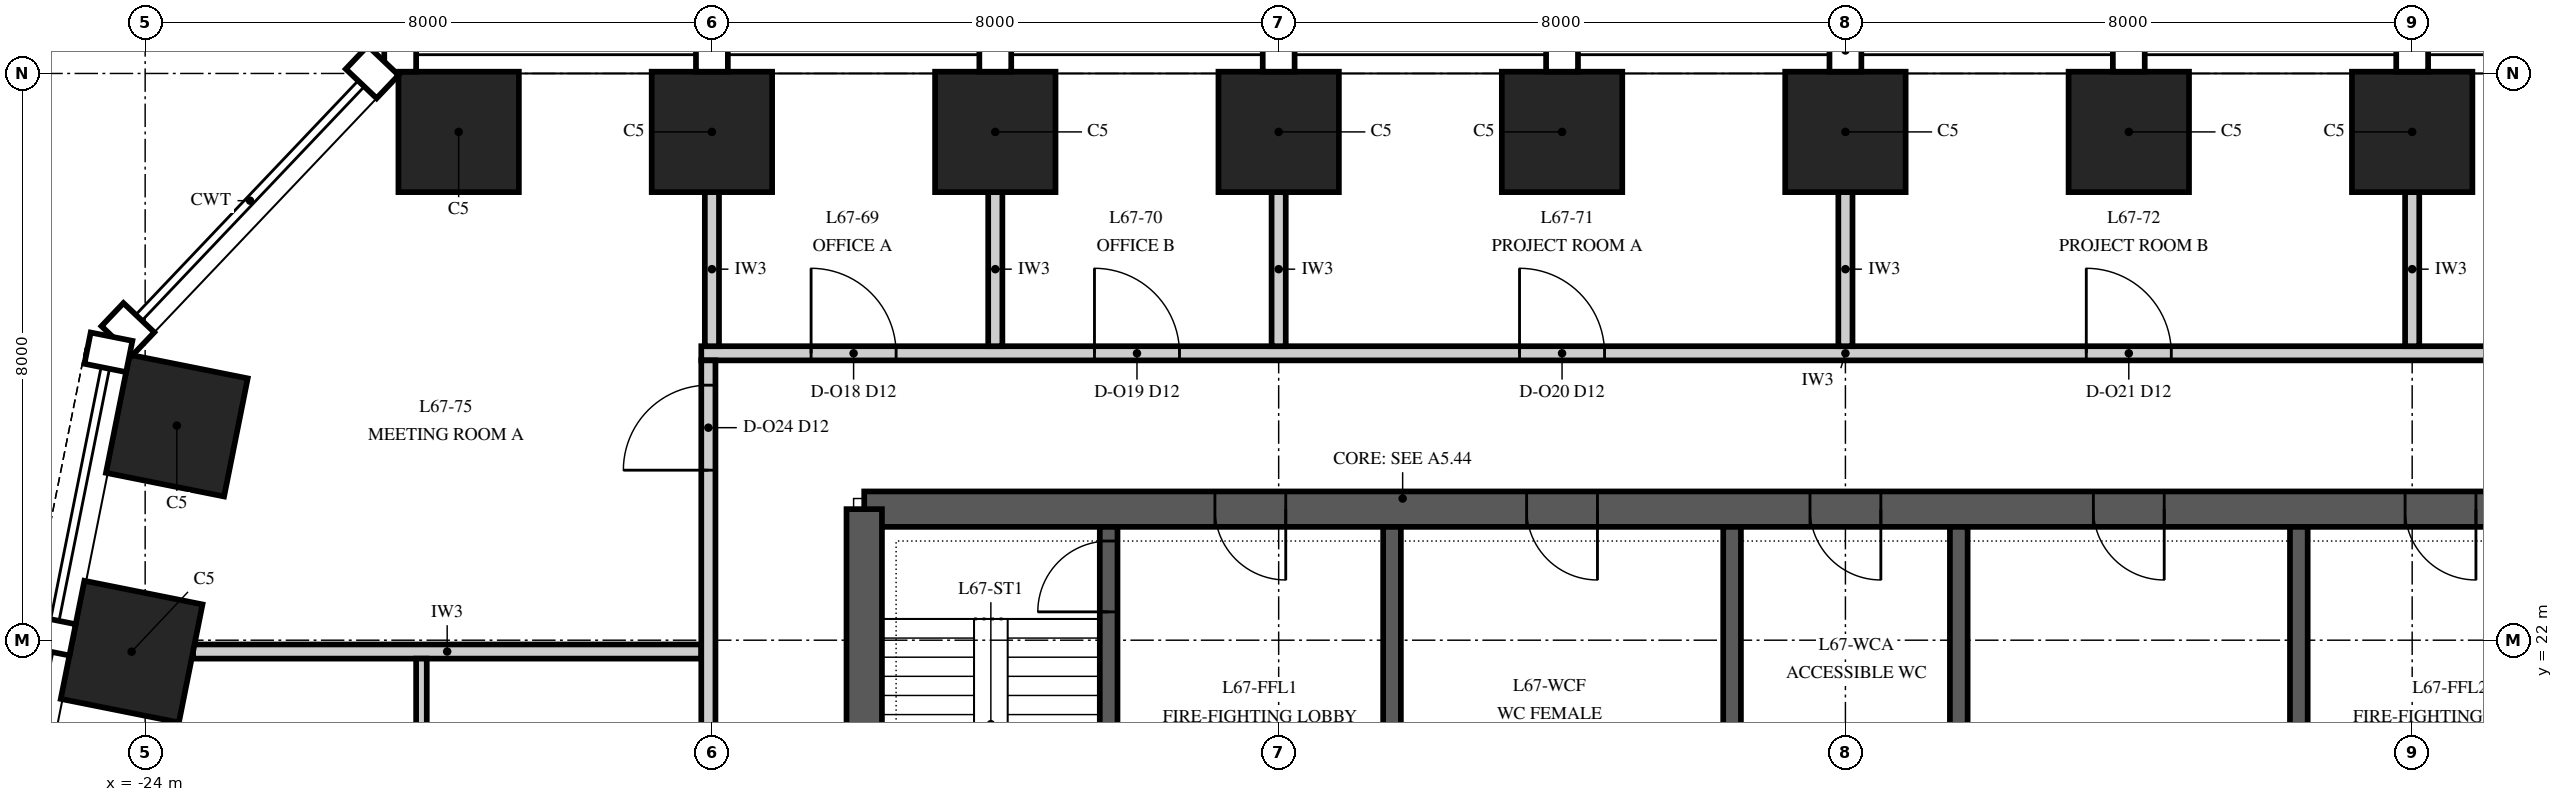
"""IFC4 building model, lengths in metres.
Left out: names, types, materials, properties, quantities, classifications, styles, units other than length and angle.
Written with IfcOpenShell. Run it as: python <this file> out.ifc"""

import sys

from ifc_helpers import new_model, si_unit, direction, frame, frame_2d, origin, origin_2d, place, context, subcontext, project, spatial, polyline, rectangle, outline, extrude, element, fill, save


model = new_model("IFC4")
c1 = context("Model", 3, precision=1e-05, world=origin(), true_north=direction((0.0, 1.0)))
c2 = subcontext(c1, "Body", "Model", "MODEL_VIEW")
j1 = project(units=[si_unit("LENGTHUNIT", "METRE"), si_unit("PLANEANGLEUNIT", "RADIAN")], contexts=[c1])
p1 = place(None, origin())
s1 = spatial("IfcSite", under=j1, at=p1, CompositionType="ELEMENT")
p2 = place(p1, origin())
s2 = spatial("IfcBuilding", under=s1, at=p2, CompositionType="ELEMENT")
p3 = place(p2, frame((0.0, 0.0, 288.0)))
s3 = spatial("IfcBuildingStorey", under=s2, at=p3, CompositionType="ELEMENT", Elevation=288.0)
for number, where, z_axis, x_axis in (
    (1, (8.0, 29.175, 0.0), (0.0, 0.0, 1.0), (-1.0, 0.0, 0.0)),
    (2, (4.0, 29.175, 0.0), (0.0, 0.0, 1.0), (-1.0, 0.0, 0.0)),
    (3, (0.0, 29.175, 0.0), (0.0, 0.0, 1.0), (-1.0, 0.0, 0.0)),
    (4, (-4.0, 29.175, 0.0), (0.0, 0.0, 1.0), (-1.0, 0.0, 0.0)),
    (5, (-8.0, 29.175, 0.0), (0.0, 0.0, 1.0), (-1.0, 0.0, 0.0)),
    (6, (-12.0, 29.175, 0.0), (0.0, 0.0, 1.0), (-1.0, 0.0, 0.0)),
    (7, (-16.0, 29.175, 0.0), (0.0, 0.0, 1.0), (-1.0, 0.0, 0.0)),
    (8, (-19.575, 29.175, 0.0), (0.0, 0.0, 1.0), (-1.0, 0.0, 0.0)),
    (9, (-23.553, 25.029, 0.0), (0.0, 0.0, 1.0), (-0.196, -0.981, 0.0)),
    (10, (-24.191, 21.838, 0.0), (0.0, 0.0, 1.0), (-0.196, -0.981, 0.0)),
):
    element("IfcColumn", number, at=place(p3, frame(where, z_axis=z_axis, x_axis=x_axis)), inside=s3, PredefinedType="COLUMN", context=c2, shape_type="SweptSolid", body=[
        extrude(rectangle(XDim=1.7, YDim=1.7, at=origin_2d()), origin(), (0.0, 0.0, 1.0), 4.0),
    ])
p4 = place(p3, frame((13.85, 23.85, 0.0), z_axis=(0.0, 0.0, 1.0), x_axis=(-1.0, 0.0, 0.0)))
e11 = element("IfcWall", 11, at=p4, inside=s3, PredefinedType="SHEAR", context=c2, shape_type="SweptSolid", body=[
    extrude(rectangle(XDim=27.7, YDim=0.5, at=frame_2d((13.85, 0.0))), origin(), (0.0, 0.0, 1.0), 4.0),
])
p5 = place(p4, frame((21.75, 0.0, 0.0)))
e12 = element("IfcOpeningElement", 12, at=p5, cuts=e11, PredefinedType="OPENING", context=c2, shape_type="SweptSolid", body=[
    extrude(rectangle(XDim=1.0, YDim=2.1, at=frame_2d((0.5, 1.05))), frame((0.0, 0.265, 0.0), z_axis=(0.0, -1.0, 0.0), x_axis=(1.0, 0.0, 0.0)), (0.0, 0.0, 1.0), 0.53),
])
p6 = place(p4, frame((4.95, 0.0, 0.0)))
e13 = element("IfcOpeningElement", 13, at=p6, cuts=e11, PredefinedType="OPENING", context=c2, shape_type="SweptSolid", body=[
    extrude(rectangle(XDim=1.0, YDim=2.1, at=frame_2d((0.5, 1.05))), frame((0.0, 0.265, 0.0), z_axis=(0.0, -1.0, 0.0), x_axis=(1.0, 0.0, 0.0)), (0.0, 0.0, 1.0), 0.53),
])
p7 = place(p4, frame((17.35, 0.0, 0.0)))
e14 = element("IfcOpeningElement", 14, at=p7, cuts=e11, PredefinedType="OPENING", context=c2, shape_type="SweptSolid", body=[
    extrude(rectangle(XDim=1.0, YDim=2.1, at=frame_2d((0.5, 1.05))), frame((0.0, 0.265, 0.0), z_axis=(0.0, -1.0, 0.0), x_axis=(1.0, 0.0, 0.0)), (0.0, 0.0, 1.0), 0.53),
])
p8 = place(p4, frame((13.35, 0.0, 0.0)))
e15 = element("IfcOpeningElement", 15, at=p8, cuts=e11, PredefinedType="OPENING", context=c2, shape_type="SweptSolid", body=[
    extrude(rectangle(XDim=1.0, YDim=2.1, at=frame_2d((0.5, 1.05))), frame((0.0, 0.265, 0.0), z_axis=(0.0, -1.0, 0.0), x_axis=(1.0, 0.0, 0.0)), (0.0, 0.0, 1.0), 0.53),
])
p9 = place(p4, frame((9.35, 0.0, 0.0)))
e16 = element("IfcOpeningElement", 16, at=p9, cuts=e11, PredefinedType="OPENING", context=c2, shape_type="SweptSolid", body=[
    extrude(rectangle(XDim=1.0, YDim=2.1, at=frame_2d((0.5, 1.05))), frame((0.0, 0.265, 0.0), z_axis=(0.0, -1.0, 0.0), x_axis=(1.0, 0.0, 0.0)), (0.0, 0.0, 1.0), 0.53),
])
p10 = place(p3, frame((-13.85, 23.85, 0.0), z_axis=(0.0, 0.0, 1.0), x_axis=(0.0, -1.0, 0.0)))
e17 = element("IfcWall", 17, at=p10, inside=s3, PredefinedType="SHEAR", context=c2, shape_type="SweptSolid", body=[
    extrude(outline(polyline([(0.0, -0.25), (17.7, -0.25), (17.7, 0.0), (17.45, 0.0), (17.45, 0.25), (0.25, 0.25), (0.25, 0.0), (0.0, 0.0), (0.0, -0.25)])), origin(), (0.0, 0.0, 1.0), 4.0),
])
p11 = place(p10, frame((11.75, 0.0, 0.0)))
e18 = element("IfcOpeningElement", 18, at=p11, cuts=e17, PredefinedType="OPENING", context=c2, shape_type="SweptSolid", body=[
    extrude(rectangle(XDim=1.8, YDim=2.4, at=frame_2d((0.9, 1.2))), frame((0.0, 0.265, 0.0), z_axis=(0.0, -1.0, 0.0), x_axis=(1.0, 0.0, 0.0)), (0.0, 0.0, 1.0), 0.53),
])
p12 = place(p3, frame((-10.4, 16.125, 0.0), z_axis=(0.0, 0.0, 1.0), x_axis=(0.0, 1.0, 0.0)))
e19 = element("IfcWall", 19, at=p12, inside=s3, PredefinedType="SHEAR", context=c2, shape_type="SweptSolid", body=[
    extrude(rectangle(XDim=7.475, YDim=0.25, at=frame_2d((3.738, 0.0))), origin(), (0.0, 0.0, 1.0), 4.0),
])
p13 = place(p12, frame((6.275, 0.0, 0.0)))
e20 = element("IfcOpeningElement", 20, at=p13, cuts=e19, PredefinedType="OPENING", context=c2, shape_type="SweptSolid", body=[
    extrude(rectangle(XDim=1.0, YDim=2.1, at=frame_2d((0.5, 1.05))), frame((0.0, 0.14, 0.0), z_axis=(0.0, -1.0, 0.0), x_axis=(1.0, 0.0, 0.0)), (0.0, 0.0, 1.0), 0.28),
])
for number, where, z_axis, x_axis in (
    (21, (-6.4, 16.125, 0.0), (0.0, 0.0, 1.0), (0.0, 1.0, 0.0)),
    (22, (-1.6, 16.125, 0.0), (0.0, 0.0, 1.0), (0.0, 1.0, 0.0)),
    (23, (1.6, 16.125, 0.0), (0.0, 0.0, 1.0), (0.0, 1.0, 0.0)),
    (24, (6.4, 16.125, 0.0), (0.0, 0.0, 1.0), (0.0, 1.0, 0.0)),
):
    element("IfcWall", number, at=place(p3, frame(where, z_axis=z_axis, x_axis=x_axis)), inside=s3, PredefinedType="SHEAR", context=c2, shape_type="SweptSolid", body=[
        extrude(rectangle(XDim=7.475, YDim=0.25, at=frame_2d((3.738, 0.0))), origin(), (0.0, 0.0, 1.0), 4.0),
    ])
p14 = place(p3, frame((-23.324, 21.84, 0.0), z_axis=(0.0, 0.0, 1.0), x_axis=(1.0, 0.0, 0.0)))
e25 = element("IfcWall", 25, at=p14, inside=s3, PredefinedType="PARTITIONING", context=c2, shape_type="SweptSolid", body=[
    extrude(rectangle(XDim=7.174, YDim=0.2, at=frame_2d((3.587, 0.0))), origin(), (0.0, 0.0, 1.0), 3.23),
])
p15 = place(p3, frame((-16.15, 26.05, 0.0), z_axis=(0.0, 0.0, 1.0), x_axis=(1.0, 0.0, 0.0)))
e26 = element("IfcWall", 26, at=p15, inside=s3, PredefinedType="PARTITIONING", context=c2, shape_type="SweptSolid", body=[
    extrude(rectangle(XDim=32.3, YDim=0.2, at=frame_2d((16.15, 0.0))), origin(), (0.0, 0.0, 1.0), 3.418),
])
p16 = place(p15, frame((1.55, 0.0, 0.0)))
e27 = element("IfcOpeningElement", 27, at=p16, cuts=e26, PredefinedType="OPENING", context=c2, shape_type="SweptSolid", body=[
    extrude(rectangle(XDim=1.2, YDim=2.4, at=frame_2d((0.6, 1.2))), frame((0.0, 0.115, 0.0), z_axis=(0.0, -1.0, 0.0), x_axis=(1.0, 0.0, 0.0)), (0.0, 0.0, 1.0), 0.23),
])
p17 = place(p15, frame((5.55, 0.0, 0.0)))
e28 = element("IfcOpeningElement", 28, at=p17, cuts=e26, PredefinedType="OPENING", context=c2, shape_type="SweptSolid", body=[
    extrude(rectangle(XDim=1.2, YDim=2.4, at=frame_2d((0.6, 1.2))), frame((0.0, 0.115, 0.0), z_axis=(0.0, -1.0, 0.0), x_axis=(1.0, 0.0, 0.0)), (0.0, 0.0, 1.0), 0.23),
])
p18 = place(p15, frame((11.55, 0.0, 0.0)))
e29 = element("IfcOpeningElement", 29, at=p18, cuts=e26, PredefinedType="OPENING", context=c2, shape_type="SweptSolid", body=[
    extrude(rectangle(XDim=1.2, YDim=2.4, at=frame_2d((0.6, 1.2))), frame((0.0, 0.115, 0.0), z_axis=(0.0, -1.0, 0.0), x_axis=(1.0, 0.0, 0.0)), (0.0, 0.0, 1.0), 0.23),
])
p19 = place(p15, frame((19.55, 0.0, 0.0)))
e30 = element("IfcOpeningElement", 30, at=p19, cuts=e26, PredefinedType="OPENING", context=c2, shape_type="SweptSolid", body=[
    extrude(rectangle(XDim=1.2, YDim=2.4, at=frame_2d((0.6, 1.2))), frame((0.0, 0.115, 0.0), z_axis=(0.0, -1.0, 0.0), x_axis=(1.0, 0.0, 0.0)), (0.0, 0.0, 1.0), 0.23),
])
p20 = place(p15, frame((25.55, 0.0, 0.0)))
e31 = element("IfcOpeningElement", 31, at=p20, cuts=e26, PredefinedType="OPENING", context=c2, shape_type="SweptSolid", body=[
    extrude(rectangle(XDim=1.2, YDim=2.4, at=frame_2d((0.6, 1.2))), frame((0.0, 0.115, 0.0), z_axis=(0.0, -1.0, 0.0), x_axis=(1.0, 0.0, 0.0)), (0.0, 0.0, 1.0), 0.23),
])
p21 = place(p15, frame((29.55, 0.0, 0.0)))
e32 = element("IfcOpeningElement", 32, at=p21, cuts=e26, PredefinedType="OPENING", context=c2, shape_type="SweptSolid", body=[
    extrude(rectangle(XDim=1.2, YDim=2.4, at=frame_2d((0.6, 1.2))), frame((0.0, 0.115, 0.0), z_axis=(0.0, -1.0, 0.0), x_axis=(1.0, 0.0, 0.0)), (0.0, 0.0, 1.0), 0.23),
])
p22 = place(p3, frame((-20.1, 13.915, 0.0), z_axis=(0.0, 0.0, 1.0), x_axis=(0.0, 1.0, 0.0)))
e33 = element("IfcWall", 33, at=p22, inside=s3, PredefinedType="PARTITIONING", context=c2, shape_type="SweptSolid", body=[
    extrude(rectangle(XDim=7.825, YDim=0.15, at=frame_2d((3.913, 0.0))), origin(), (0.0, 0.0, 1.0), 3.23),
])
p23 = place(p22, frame((3.425, 0.0, 0.0)))
e34 = element("IfcOpeningElement", 34, at=p23, cuts=e33, PredefinedType="OPENING", context=c2, shape_type="SweptSolid", body=[
    extrude(rectangle(XDim=1.0, YDim=2.3, at=frame_2d((0.5, 1.15))), frame((0.0, 0.09, 0.0), z_axis=(0.0, -1.0, 0.0), x_axis=(1.0, 0.0, 0.0)), (0.0, 0.0, 1.0), 0.18),
])
p24 = place(p3, frame((-16.05, 4.05, 0.0), z_axis=(0.0, 0.0, 1.0), x_axis=(0.0, 1.0, 0.0)))
e35 = element("IfcWall", 35, at=p24, inside=s3, PredefinedType="PARTITIONING", context=c2, shape_type="SweptSolid", body=[
    extrude(rectangle(XDim=21.9, YDim=0.2, at=frame_2d((10.95, 0.0))), origin(), (0.0, 0.0, 1.0), 2.842),
])
p25 = place(p24, frame((20.35, 0.0, 0.0)))
e36 = element("IfcOpeningElement", 36, at=p25, cuts=e35, PredefinedType="OPENING", context=c2, shape_type="SweptSolid", body=[
    extrude(rectangle(XDim=1.2, YDim=2.4, at=frame_2d((0.6, 1.2))), frame((0.0, 0.115, 0.0), z_axis=(0.0, -1.0, 0.0), x_axis=(1.0, 0.0, 0.0)), (0.0, 0.0, 1.0), 0.23),
])
p26 = place(p24, frame((10.35, 0.0, 0.0)))
e37 = element("IfcOpeningElement", 37, at=p26, cuts=e35, PredefinedType="OPENING", context=c2, shape_type="SweptSolid", body=[
    extrude(rectangle(XDim=1.2, YDim=2.4, at=frame_2d((0.6, 1.2))), frame((0.0, 0.115, 0.0), z_axis=(0.0, -1.0, 0.0), x_axis=(1.0, 0.0, 0.0)), (0.0, 0.0, 1.0), 0.23),
])
for number, where, z_axis, x_axis in (
    (38, (-16.0, 26.15, 0.0), (0.0, 0.0, 1.0), (0.0, 1.0, 0.0)),
    (39, (-12.0, 26.15, 0.0), (0.0, 0.0, 1.0), (0.0, 1.0, 0.0)),
    (40, (-8.0, 26.15, 0.0), (0.0, 0.0, 1.0), (0.0, 1.0, 0.0)),
    (41, (0.0, 26.15, 0.0), (0.0, 0.0, 1.0), (0.0, 1.0, 0.0)),
    (42, (8.0, 26.15, 0.0), (0.0, 0.0, 1.0), (0.0, 1.0, 0.0)),
):
    element("IfcWall", number, at=place(p3, frame(where, z_axis=z_axis, x_axis=x_axis)), inside=s3, PredefinedType="PARTITIONING", context=c2, shape_type="SweptSolid", body=[
        extrude(rectangle(XDim=2.175, YDim=0.2, at=frame_2d((1.087, 0.0))), origin(), (0.0, 0.0, 1.0), 3.418),
    ])
p27 = place(p5, origin())
e43 = element("IfcDoor", 43, at=p27, inside=s3, OperationType="SINGLE_SWING_RIGHT", PredefinedType="DOOR", context=c2, shape_type="SweptSolid", body=[
    extrude(rectangle(XDim=1.0, YDim=2.1, at=frame_2d((0.5, 1.05))), frame((0.0, 0.25, 0.0), z_axis=(0.0, -1.0, 0.0), x_axis=(1.0, 0.0, 0.0)), (0.0, 0.0, 1.0), 0.5),
])
fill(e12, e43)
p28 = place(p6, origin())
e44 = element("IfcDoor", 44, at=p28, inside=s3, OperationType="SINGLE_SWING_RIGHT", PredefinedType="DOOR", context=c2, shape_type="SweptSolid", body=[
    extrude(rectangle(XDim=1.0, YDim=2.1, at=frame_2d((0.5, 1.05))), frame((0.0, 0.25, 0.0), z_axis=(0.0, -1.0, 0.0), x_axis=(1.0, 0.0, 0.0)), (0.0, 0.0, 1.0), 0.5),
])
fill(e13, e44)
p29 = place(p7, origin())
e45 = element("IfcDoor", 45, at=p29, inside=s3, OperationType="SINGLE_SWING_LEFT", PredefinedType="DOOR", context=c2, shape_type="SweptSolid", body=[
    extrude(rectangle(XDim=1.0, YDim=2.1, at=frame_2d((0.5, 1.05))), frame((0.0, 0.25, 0.0), z_axis=(0.0, -1.0, 0.0), x_axis=(1.0, 0.0, 0.0)), (0.0, 0.0, 1.0), 0.5),
])
fill(e14, e45)
p30 = place(p8, origin())
e46 = element("IfcDoor", 46, at=p30, inside=s3, OperationType="SINGLE_SWING_LEFT", PredefinedType="DOOR", context=c2, shape_type="SweptSolid", body=[
    extrude(rectangle(XDim=1.0, YDim=2.1, at=frame_2d((0.5, 1.05))), frame((0.0, 0.25, 0.0), z_axis=(0.0, -1.0, 0.0), x_axis=(1.0, 0.0, 0.0)), (0.0, 0.0, 1.0), 0.5),
])
fill(e15, e46)
p31 = place(p9, origin())
e47 = element("IfcDoor", 47, at=p31, inside=s3, OperationType="SINGLE_SWING_LEFT", PredefinedType="DOOR", context=c2, shape_type="SweptSolid", body=[
    extrude(rectangle(XDim=1.0, YDim=2.1, at=frame_2d((0.5, 1.05))), frame((0.0, 0.25, 0.0), z_axis=(0.0, -1.0, 0.0), x_axis=(1.0, 0.0, 0.0)), (0.0, 0.0, 1.0), 0.5),
])
fill(e16, e47)
p32 = place(p13, origin())
e48 = element("IfcDoor", 48, at=p32, inside=s3, OperationType="SINGLE_SWING_LEFT", PredefinedType="DOOR", context=c2, shape_type="SweptSolid", body=[
    extrude(rectangle(XDim=1.0, YDim=2.1, at=frame_2d((0.5, 1.05))), frame((0.0, 0.125, 0.0), z_axis=(0.0, -1.0, 0.0), x_axis=(1.0, 0.0, 0.0)), (0.0, 0.0, 1.0), 0.25),
])
fill(e20, e48)
p33 = place(p16, origin())
e49 = element("IfcDoor", 49, at=p33, inside=s3, OperationType="SINGLE_SWING_LEFT", PredefinedType="DOOR", context=c2, shape_type="SweptSolid", body=[
    extrude(rectangle(XDim=1.2, YDim=2.4, at=frame_2d((0.6, 1.2))), frame((0.0, 0.1, 0.0), z_axis=(0.0, -1.0, 0.0), x_axis=(1.0, 0.0, 0.0)), (0.0, 0.0, 1.0), 0.199),
])
fill(e27, e49)
p34 = place(p17, origin())
e50 = element("IfcDoor", 50, at=p34, inside=s3, OperationType="SINGLE_SWING_LEFT", PredefinedType="DOOR", context=c2, shape_type="SweptSolid", body=[
    extrude(rectangle(XDim=1.2, YDim=2.4, at=frame_2d((0.6, 1.2))), frame((0.0, 0.1, 0.0), z_axis=(0.0, -1.0, 0.0), x_axis=(1.0, 0.0, 0.0)), (0.0, 0.0, 1.0), 0.199),
])
fill(e28, e50)
p35 = place(p18, origin())
e51 = element("IfcDoor", 51, at=p35, inside=s3, OperationType="SINGLE_SWING_LEFT", PredefinedType="DOOR", context=c2, shape_type="SweptSolid", body=[
    extrude(rectangle(XDim=1.2, YDim=2.4, at=frame_2d((0.6, 1.2))), frame((0.0, 0.1, 0.0), z_axis=(0.0, -1.0, 0.0), x_axis=(1.0, 0.0, 0.0)), (0.0, 0.0, 1.0), 0.199),
])
fill(e29, e51)
p36 = place(p19, origin())
e52 = element("IfcDoor", 52, at=p36, inside=s3, OperationType="SINGLE_SWING_LEFT", PredefinedType="DOOR", context=c2, shape_type="SweptSolid", body=[
    extrude(rectangle(XDim=1.2, YDim=2.4, at=frame_2d((0.6, 1.2))), frame((0.0, 0.1, 0.0), z_axis=(0.0, -1.0, 0.0), x_axis=(1.0, 0.0, 0.0)), (0.0, 0.0, 1.0), 0.199),
])
fill(e30, e52)
p37 = place(p25, origin())
e53 = element("IfcDoor", 53, at=p37, inside=s3, OperationType="SINGLE_SWING_LEFT", PredefinedType="DOOR", context=c2, shape_type="SweptSolid", body=[
    extrude(rectangle(XDim=1.2, YDim=2.4, at=frame_2d((0.6, 1.2))), frame((0.0, 0.1, 0.0), z_axis=(0.0, -1.0, 0.0), x_axis=(1.0, 0.0, 0.0)), (0.0, 0.0, 1.0), 0.199),
])
fill(e36, e53)
save(model, sys.argv[1])
